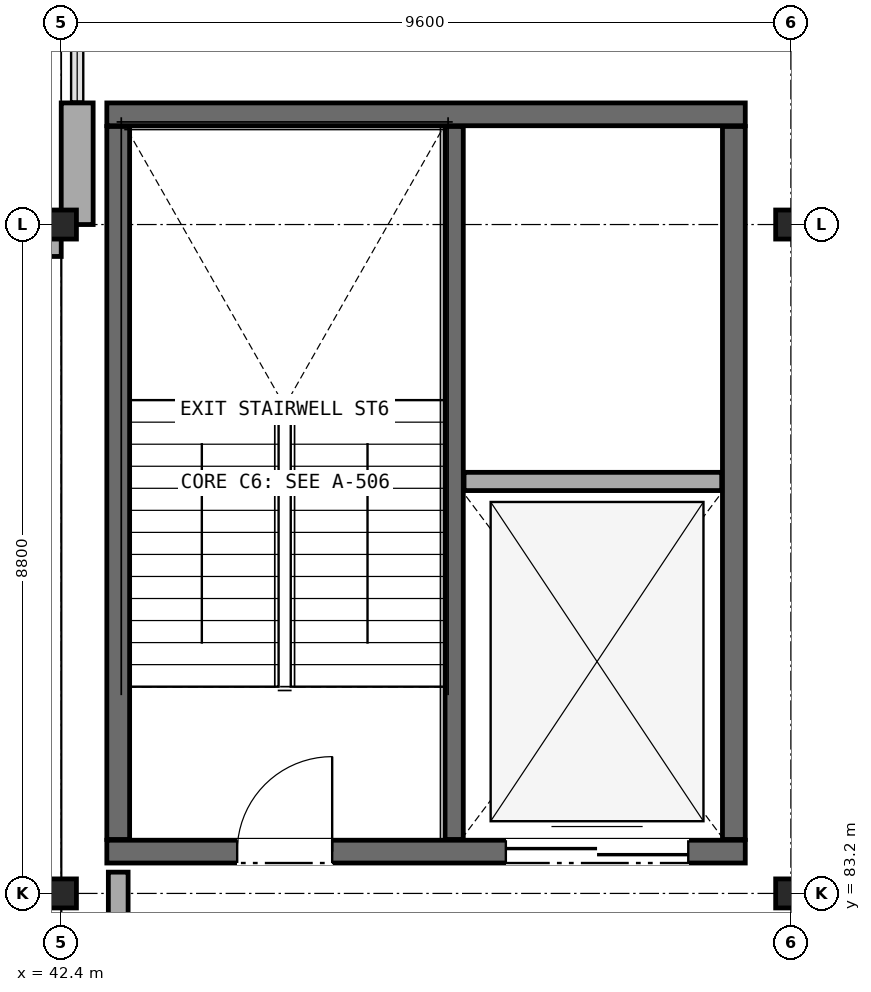
"""IFC4 building model, lengths in metres.
Left out: names, types, materials, properties, quantities, classifications, styles, units other than length and angle.
Written with IfcOpenShell. Run it as: python <this file> out.ifc"""

import sys

from ifc_helpers import new_model, si_unit, direction, frame, frame_2d, origin, origin_2d, place, context, subcontext, project, spatial, rectangle, i_section, extrude, element, fill, save


model = new_model("IFC4")
c1 = context("Model", 3, precision=1e-05, world=origin(), true_north=direction((0.0, 1.0)))
c2 = subcontext(c1, "Body", "Model", "MODEL_VIEW")
j1 = project(units=[si_unit("LENGTHUNIT", "METRE"), si_unit("PLANEANGLEUNIT", "RADIAN")], contexts=[c1])
p1 = place(None, origin())
s1 = spatial("IfcSite", under=j1, at=p1, CompositionType="ELEMENT")
p2 = place(p1, origin())
s2 = spatial("IfcBuilding", under=s1, at=p2, CompositionType="ELEMENT")
p3 = place(p2, frame((0.0, 0.0, 10.1)))
s3 = spatial("IfcBuildingStorey", under=s2, at=p3, CompositionType="ELEMENT", Elevation=10.1)
for number, where, z_axis, x_axis in (
    (1, (42.4, 83.2, 0.0), (0.0, 0.0, 1.0), (1.0, 0.0, 0.0)),
    (2, (42.4, 92.0, 0.0), (0.0, 0.0, 1.0), (1.0, 0.0, 0.0)),
    (3, (52.0, 83.2, 0.0), (0.0, 0.0, 1.0), (1.0, 0.0, 0.0)),
    (4, (52.0, 92.0, 0.0), (0.0, 0.0, 1.0), (1.0, 0.0, 0.0)),
):
    element("IfcColumn", number, at=place(p3, frame(where, z_axis=z_axis, x_axis=x_axis)), inside=s3, PredefinedType="COLUMN", context=c2, shape_type="SweptSolid", body=[
        extrude(i_section(OverallWidth=0.4, OverallDepth=0.382, WebThickness=0.025, FlangeThickness=0.036, at=origin_2d()), origin(), (0.0, 0.0, 1.0), 4.5),
    ])
p4 = place(p3, frame((42.61, 93.6, 0.0), z_axis=(0.0, 0.0, 1.0), x_axis=(0.0, -1.0, 0.0)))
e5 = element("IfcWall", 5, at=p4, inside=s3, PredefinedType="SOLIDWALL", context=c2, shape_type="SweptSolid", body=[
    extrude(rectangle(XDim=1.6, YDim=0.42, at=frame_2d((0.8, 0.0))), origin(), (0.0, 0.0, 1.0), 3.738),
])
p5 = place(p3, frame((42.4, 91.79, 0.0), z_axis=(0.0, 0.0, 1.0), x_axis=(-1.0, 0.0, 0.0)))
e6 = element("IfcWall", 6, at=p5, inside=s3, PredefinedType="SOLIDWALL", context=c2, shape_type="SweptSolid", body=[
    extrude(rectangle(XDim=35.4, YDim=0.42, at=frame_2d((17.7, 0.0))), origin(), (0.0, 0.0, 1.0), 3.668),
])
p6 = place(p5, frame((1.8, 0.0, 0.9)))
e7 = element("IfcOpeningElement", 7, at=p6, cuts=e6, PredefinedType="OPENING", context=c2, shape_type="SweptSolid", body=[
    extrude(rectangle(XDim=2.4, YDim=1.85, at=frame_2d((1.2, 0.925))), frame((0.0, 0.22, 0.0), z_axis=(0.0, -1.0, 0.0), x_axis=(1.0, 0.0, 0.0)), (0.0, 0.0, 1.0), 0.44),
])
p7 = place(p5, frame((11.0, 0.0, 0.9)))
e8 = element("IfcOpeningElement", 8, at=p7, cuts=e6, PredefinedType="OPENING", context=c2, shape_type="SweptSolid", body=[
    extrude(rectangle(XDim=2.65, YDim=1.85, at=frame_2d((1.325, 0.925))), frame((0.0, 0.22, 0.0), z_axis=(0.0, -1.0, 0.0), x_axis=(1.0, 0.0, 0.0)), (0.0, 0.0, 1.0), 0.44),
])
p8 = place(p5, frame((15.6, 0.0, 0.9)))
e9 = element("IfcOpeningElement", 9, at=p8, cuts=e6, PredefinedType="OPENING", context=c2, shape_type="SweptSolid", body=[
    extrude(rectangle(XDim=0.95, YDim=2.15, at=frame_2d((0.475, 1.075))), frame((0.0, 0.22, 0.0), z_axis=(0.0, -1.0, 0.0), x_axis=(1.0, 0.0, 0.0)), (0.0, 0.0, 1.0), 0.44),
])
p9 = place(p5, frame((20.2, 0.0, 0.9)))
e10 = element("IfcOpeningElement", 10, at=p9, cuts=e6, PredefinedType="OPENING", context=c2, shape_type="SweptSolid", body=[
    extrude(rectangle(XDim=1.1, YDim=2.15, at=frame_2d((0.55, 1.075))), frame((0.0, 0.22, 0.0), z_axis=(0.0, -1.0, 0.0), x_axis=(1.0, 0.0, 0.0)), (0.0, 0.0, 1.0), 0.44),
])
p10 = place(p5, frame((24.8, 0.0, 0.9)))
e11 = element("IfcOpeningElement", 11, at=p10, cuts=e6, PredefinedType="OPENING", context=c2, shape_type="SweptSolid", body=[
    extrude(rectangle(XDim=1.25, YDim=2.15, at=frame_2d((0.625, 1.075))), frame((0.0, 0.22, 0.0), z_axis=(0.0, -1.0, 0.0), x_axis=(1.0, 0.0, 0.0)), (0.0, 0.0, 1.0), 0.44),
])
p11 = place(p3, frame((43.0, 83.75, 0.0), z_axis=(0.0, 0.0, 1.0), x_axis=(1.0, 0.0, 0.0)))
e12 = element("IfcWall", 12, at=p11, inside=s3, PredefinedType="SHEAR", context=c2, shape_type="SweptSolid", body=[
    extrude(rectangle(XDim=8.4, YDim=0.3, at=frame_2d((4.2, 0.0))), origin(), (0.0, 0.0, 1.0), 4.205),
])
p12 = place(p11, frame((1.715, 0.0, 0.0)))
e13 = element("IfcOpeningElement", 13, at=p12, cuts=e12, PredefinedType="OPENING", context=c2, shape_type="SweptSolid", body=[
    extrude(rectangle(XDim=1.25, YDim=2.2, at=frame_2d((0.625, 1.1))), frame((0.0, 0.16, 0.0), z_axis=(0.0, -1.0, 0.0), x_axis=(1.0, 0.0, 0.0)), (0.0, 0.0, 1.0), 0.32),
])
p13 = place(p11, frame((5.25, 0.0, 0.0)))
e14 = element("IfcOpeningElement", 14, at=p13, cuts=e12, PredefinedType="OPENING", context=c2, shape_type="SweptSolid", body=[
    extrude(rectangle(XDim=2.4, YDim=2.55, at=frame_2d((1.2, 1.275))), frame((0.0, 0.16, 0.0), z_axis=(0.0, -1.0, 0.0), x_axis=(1.0, 0.0, 0.0)), (0.0, 0.0, 1.0), 0.32),
])
p14 = place(p3, frame((51.4, 93.45, 0.0), z_axis=(0.0, 0.0, 1.0), x_axis=(-1.0, 0.0, 0.0)))
e15 = element("IfcWall", 15, at=p14, inside=s3, PredefinedType="SHEAR", context=c2, shape_type="SweptSolid", body=[
    extrude(rectangle(XDim=8.4, YDim=0.3, at=frame_2d((4.2, 0.0))), origin(), (0.0, 0.0, 1.0), 4.205),
])
for number, where, z_axis, x_axis in (
    (16, (51.25, 83.91, 0.0), (0.0, 0.0, 1.0), (0.0, 1.0, 0.0)),
    (17, (43.15, 93.29, 0.0), (0.0, 0.0, 1.0), (0.0, -1.0, 0.0)),
):
    element("IfcWall", number, at=place(p3, frame(where, z_axis=z_axis, x_axis=x_axis)), inside=s3, PredefinedType="SHEAR", context=c2, shape_type="SweptSolid", body=[
        extrude(rectangle(XDim=9.38, YDim=0.3, at=frame_2d((4.69, 0.0))), origin(), (0.0, 0.0, 1.0), 4.205),
    ])
p15 = place(p3, frame((47.57, 83.91, 0.0), z_axis=(0.0, 0.0, 1.0), x_axis=(0.0, 1.0, 0.0)))
e18 = element("IfcWall", 18, at=p15, inside=s3, PredefinedType="SOLIDWALL", context=c2, shape_type="SweptSolid", body=[
    extrude(rectangle(XDim=9.38, YDim=0.24, at=frame_2d((4.69, 0.0))), origin(), (0.0, 0.0, 1.0), 4.205),
])
p16 = place(p3, frame((47.7, 88.62, 0.0), z_axis=(0.0, 0.0, 1.0), x_axis=(1.0, 0.0, 0.0)))
e19 = element("IfcWall", 19, at=p16, inside=s3, PredefinedType="SOLIDWALL", context=c2, shape_type="SweptSolid", body=[
    extrude(rectangle(XDim=3.39, YDim=0.24, at=frame_2d((1.695, 0.0))), origin(), (0.0, 0.0, 1.0), 4.205),
])
p17 = place(p3, frame((43.15, 83.48, 0.0), z_axis=(0.0, 0.0, 1.0), x_axis=(0.0, -1.0, 0.0)))
e20 = element("IfcWall", 20, at=p17, inside=s3, PredefinedType="SOLIDWALL", context=c2, shape_type="SweptSolid", body=[
    extrude(rectangle(XDim=3.6, YDim=0.26, at=frame_2d((1.8, 0.0))), origin(), (0.0, 0.0, 1.0), 3.573),
])
p18 = place(p17, frame((1.0, 0.0, 0.0)))
e21 = element("IfcOpeningElement", 21, at=p18, cuts=e20, PredefinedType="OPENING", context=c2, shape_type="SweptSolid", body=[
    extrude(rectangle(XDim=1.6, YDim=2.4, at=frame_2d((0.8, 1.2))), frame((0.0, 0.14, 0.0), z_axis=(0.0, -1.0, 0.0), x_axis=(1.0, 0.0, 0.0)), (0.0, 0.0, 1.0), 0.28),
])
p19 = place(p12, origin())
e22 = element("IfcDoor", 22, at=p19, inside=s3, OperationType="SINGLE_SWING_RIGHT", PredefinedType="DOOR", context=c2, shape_type="SweptSolid", body=[
    extrude(rectangle(XDim=1.25, YDim=2.2, at=frame_2d((0.625, 1.1))), frame((0.0, 0.025, 0.0), z_axis=(0.0, -1.0, 0.0), x_axis=(1.0, 0.0, 0.0)), (0.0, 0.0, 1.0), 0.05),
])
fill(e13, e22)
p20 = place(p13, origin())
e23 = element("IfcDoor", 23, at=p20, inside=s3, OperationType="DOUBLE_DOOR_SLIDING", PredefinedType="DOOR", context=c2, shape_type="SweptSolid", body=[
    extrude(rectangle(XDim=2.4, YDim=2.55, at=frame_2d((1.2, 1.275))), frame((0.0, 0.025, 0.0), z_axis=(0.0, -1.0, 0.0), x_axis=(1.0, 0.0, 0.0)), (0.0, 0.0, 1.0), 0.05),
])
fill(e14, e23)
save(model, sys.argv[1])
